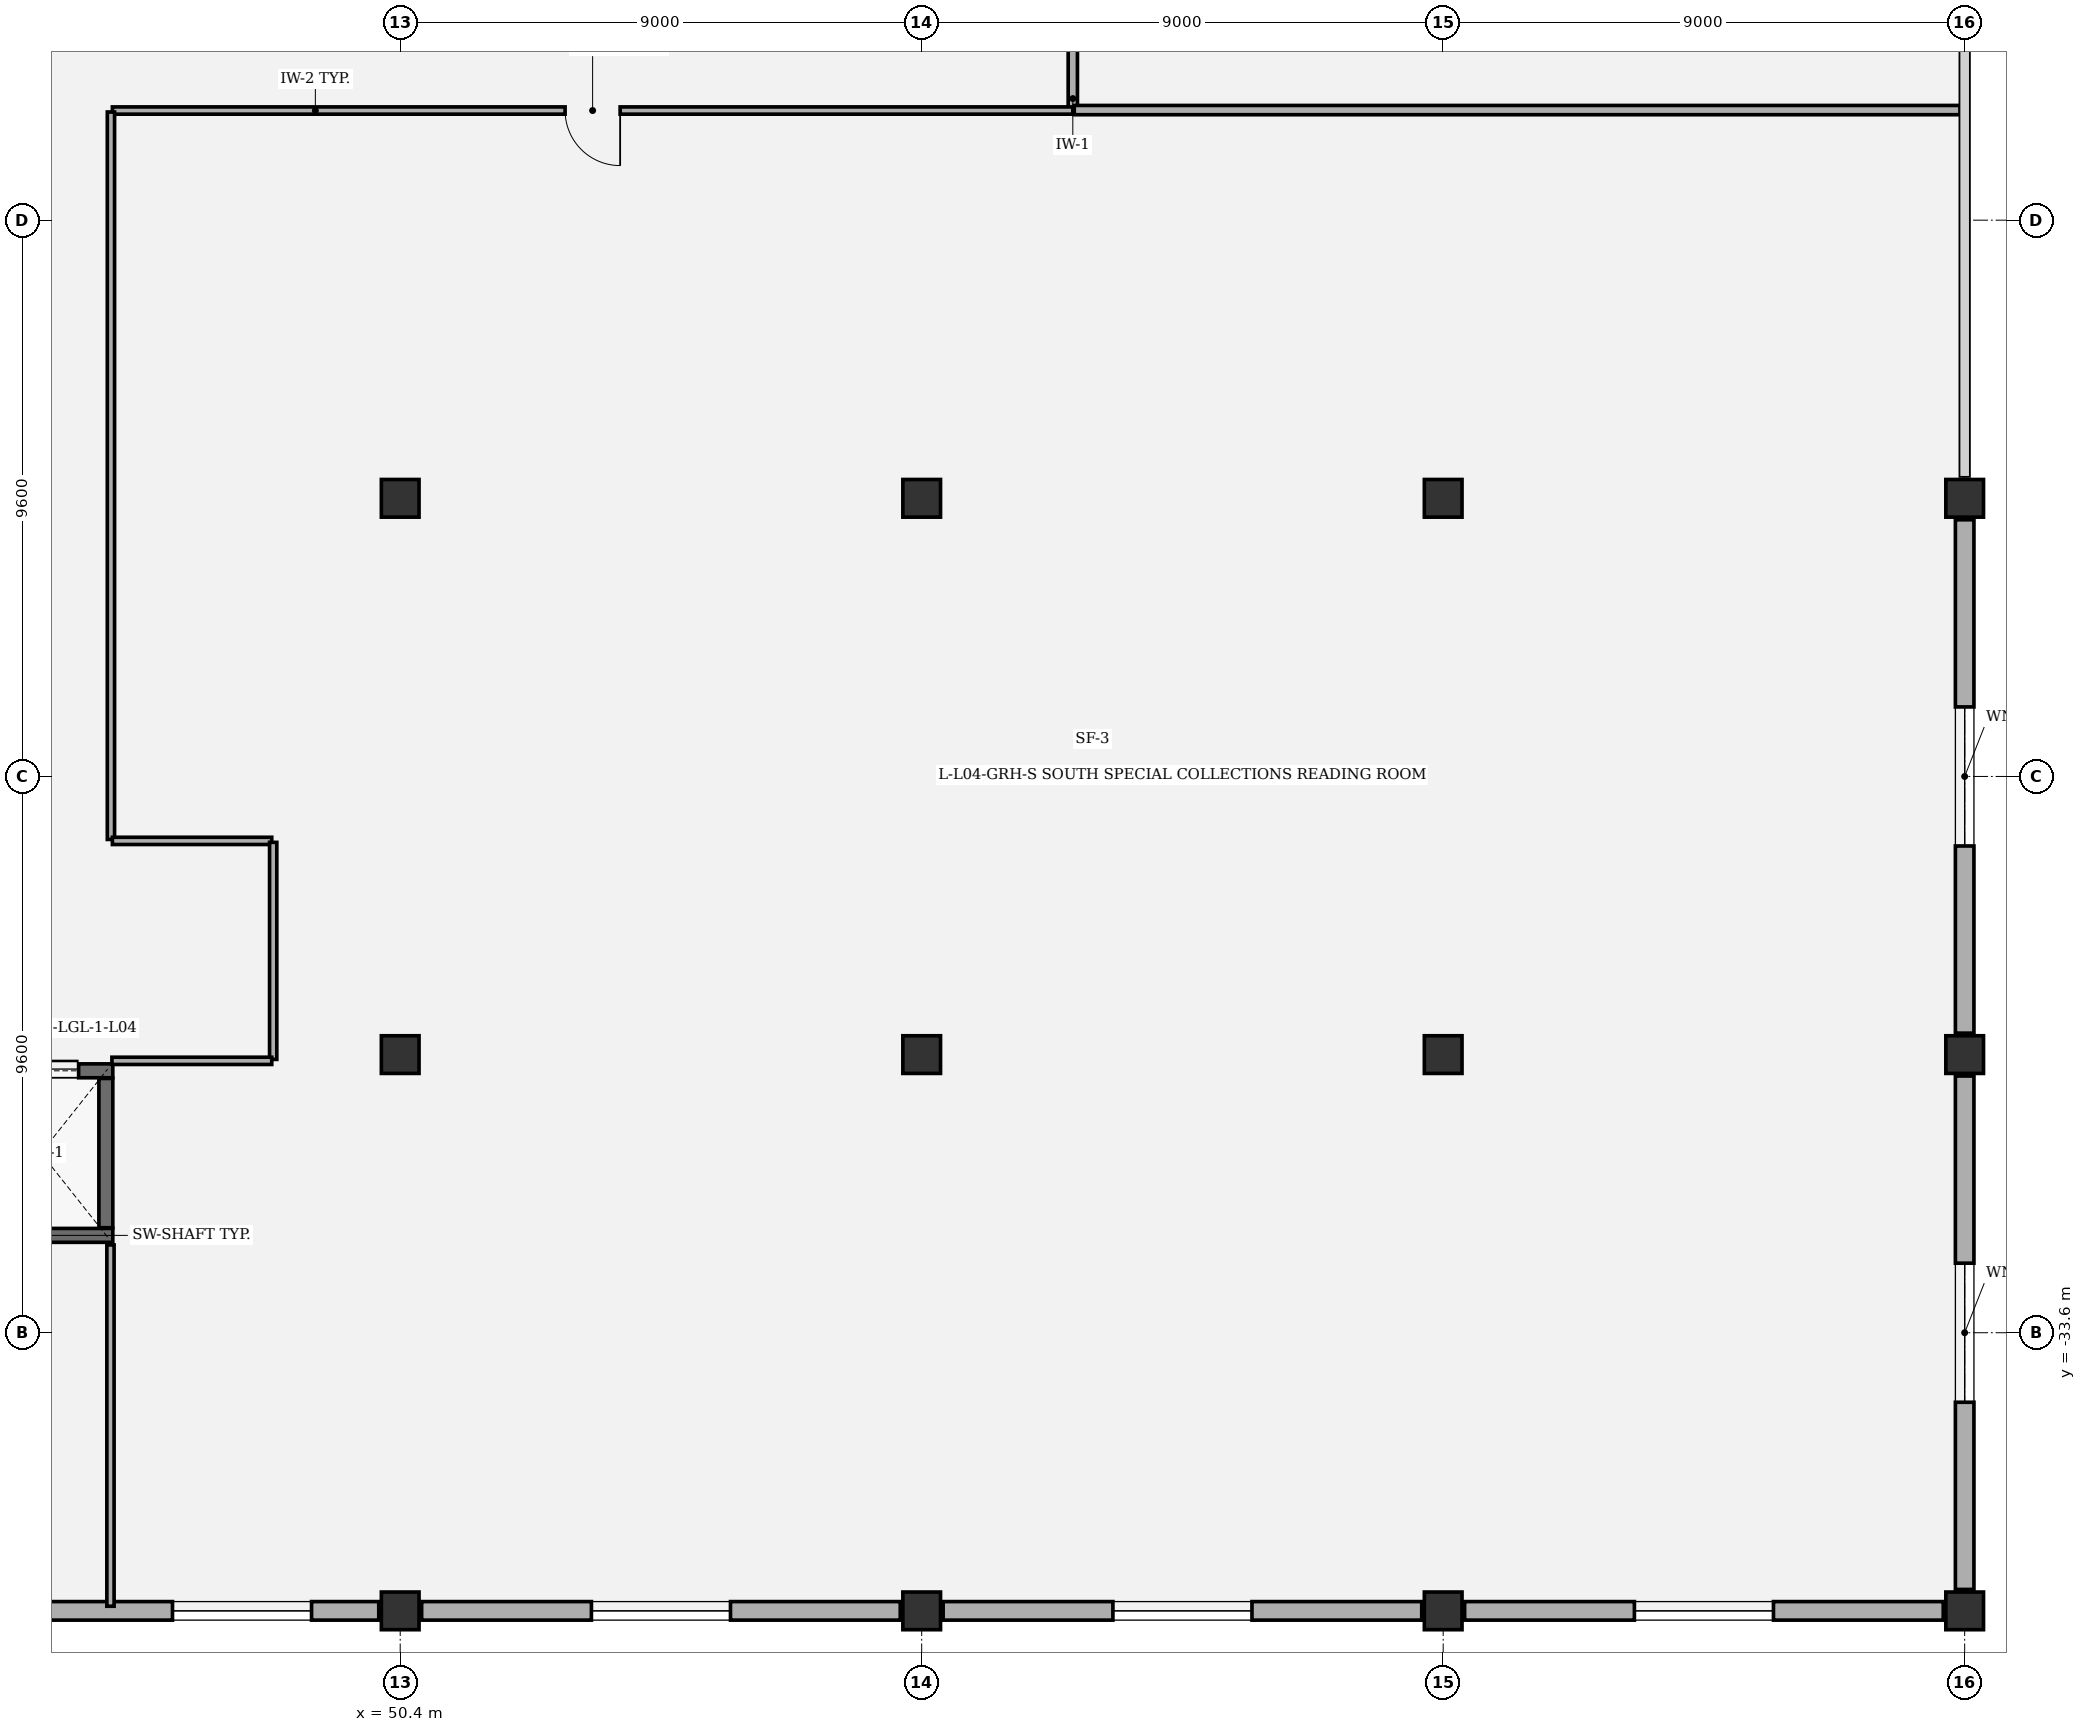
"""IFC4 building model, lengths in metres.
Left out: names, types, materials, properties, quantities, classifications, styles, units other than length and angle.
Written with IfcOpenShell. Run it as: python <this file> out.ifc"""

import sys

from ifc_helpers import new_model, si_unit, direction, frame, frame_2d, origin, origin_2d, place, context, subcontext, project, spatial, rectangle, extrude, element, fill, save


model = new_model("IFC4")
c1 = context("Model", 3, precision=1e-05, world=origin(), true_north=direction((0.0, 1.0)))
c2 = subcontext(c1, "Body", "Model", "MODEL_VIEW")
j1 = project(units=[si_unit("LENGTHUNIT", "METRE"), si_unit("PLANEANGLEUNIT", "RADIAN")], contexts=[c1])
p1 = place(None, origin())
s1 = spatial("IfcSite", under=j1, at=p1, CompositionType="ELEMENT")
p2 = place(p1, origin())
s2 = spatial("IfcBuilding", under=s1, at=p2, CompositionType="ELEMENT")
p3 = place(p2, frame((0.0, 0.0, 22.0)))
s3 = spatial("IfcBuildingStorey", under=s2, at=p3, CompositionType="ELEMENT", Elevation=22.0)
p4 = place(p3, frame((50.4, -38.4, 0.0), z_axis=(0.0, 0.0, 1.0), x_axis=(1.0, 0.0, 0.0)))
e1 = element("IfcColumn", 1, at=p4, inside=s3, PredefinedType="COLUMN", context=c2, shape_type="SweptSolid", body=[
    extrude(rectangle(XDim=0.65, YDim=0.65, at=origin_2d()), origin(), (0.0, 0.0, 1.0), 5.0),
])
p5 = place(p3, frame((50.4, -28.8, 0.0), z_axis=(0.0, 0.0, 1.0), x_axis=(1.0, 0.0, 0.0)))
e2 = element("IfcColumn", 2, at=p5, inside=s3, PredefinedType="COLUMN", context=c2, shape_type="SweptSolid", body=[
    extrude(rectangle(XDim=0.65, YDim=0.65, at=origin_2d()), origin(), (0.0, 0.0, 1.0), 7.094),
])
for number, where, z_axis, x_axis in (
    (3, (50.4, -19.2, 0.0), (0.0, 0.0, 1.0), (1.0, 0.0, 0.0)),
    (4, (59.4, -38.4, 0.0), (0.0, 0.0, 1.0), (1.0, 0.0, 0.0)),
):
    element("IfcColumn", number, at=place(p3, frame(where, z_axis=z_axis, x_axis=x_axis)), inside=s3, PredefinedType="COLUMN", context=c2, shape_type="SweptSolid", body=[
        extrude(rectangle(XDim=0.65, YDim=0.65, at=origin_2d()), origin(), (0.0, 0.0, 1.0), 5.0),
    ])
p6 = place(p3, frame((59.4, -28.8, 0.0), z_axis=(0.0, 0.0, 1.0), x_axis=(1.0, 0.0, 0.0)))
e5 = element("IfcColumn", 5, at=p6, inside=s3, PredefinedType="COLUMN", context=c2, shape_type="SweptSolid", body=[
    extrude(rectangle(XDim=0.65, YDim=0.65, at=origin_2d()), origin(), (0.0, 0.0, 1.0), 7.094),
])
for number, where, z_axis, x_axis in (
    (6, (59.4, -19.2, 0.0), (0.0, 0.0, 1.0), (1.0, 0.0, 0.0)),
    (7, (68.4, -38.4, 0.0), (0.0, 0.0, 1.0), (1.0, 0.0, 0.0)),
):
    element("IfcColumn", number, at=place(p3, frame(where, z_axis=z_axis, x_axis=x_axis)), inside=s3, PredefinedType="COLUMN", context=c2, shape_type="SweptSolid", body=[
        extrude(rectangle(XDim=0.65, YDim=0.65, at=origin_2d()), origin(), (0.0, 0.0, 1.0), 5.0),
    ])
p7 = place(p3, frame((68.4, -28.8, 0.0), z_axis=(0.0, 0.0, 1.0), x_axis=(1.0, 0.0, 0.0)))
e8 = element("IfcColumn", 8, at=p7, inside=s3, PredefinedType="COLUMN", context=c2, shape_type="SweptSolid", body=[
    extrude(rectangle(XDim=0.65, YDim=0.65, at=origin_2d()), origin(), (0.0, 0.0, 1.0), 7.094),
])
for number, where, z_axis, x_axis in (
    (9, (68.4, -19.2, 0.0), (0.0, 0.0, 1.0), (1.0, 0.0, 0.0)),
    (10, (77.4, -38.4, 0.0), (0.0, 0.0, 1.0), (1.0, 0.0, 0.0)),
):
    element("IfcColumn", number, at=place(p3, frame(where, z_axis=z_axis, x_axis=x_axis)), inside=s3, PredefinedType="COLUMN", context=c2, shape_type="SweptSolid", body=[
        extrude(rectangle(XDim=0.65, YDim=0.65, at=origin_2d()), origin(), (0.0, 0.0, 1.0), 5.0),
    ])
p8 = place(p3, frame((77.4, -28.8, 0.0), z_axis=(0.0, 0.0, 1.0), x_axis=(1.0, 0.0, 0.0)))
e11 = element("IfcColumn", 11, at=p8, inside=s3, PredefinedType="COLUMN", context=c2, shape_type="SweptSolid", body=[
    extrude(rectangle(XDim=0.65, YDim=0.65, at=origin_2d()), origin(), (0.0, 0.0, 1.0), 7.094),
])
p9 = place(p3, frame((77.4, -19.2, 0.0), z_axis=(0.0, 0.0, 1.0), x_axis=(1.0, 0.0, 0.0)))
e12 = element("IfcColumn", 12, at=p9, inside=s3, PredefinedType="COLUMN", context=c2, shape_type="SweptSolid", body=[
    extrude(rectangle(XDim=0.65, YDim=0.65, at=origin_2d()), origin(), (0.0, 0.0, 1.0), 5.0),
])
p10 = place(p3, frame((77.4, -29.17, 0.0), z_axis=(0.0, 0.0, 1.0), x_axis=(0.0, -1.0, 0.0)))
e13 = element("IfcWall", 13, at=p10, inside=s3, PredefinedType="SOLIDWALL", context=c2, shape_type="SweptSolid", body=[
    extrude(rectangle(XDim=8.86, YDim=0.32, at=frame_2d((4.43, 0.0))), origin(), (0.0, 0.0, 1.0), 4.7),
])
p11 = place(p10, frame((3.23, 0.0, 0.8)))
e14 = element("IfcOpeningElement", 14, at=p11, cuts=e13, PredefinedType="OPENING", context=c2, shape_type="SweptSolid", body=[
    extrude(rectangle(XDim=2.4, YDim=1.65, at=frame_2d((1.2, 0.825))), frame((0.0, 0.17, 0.0), z_axis=(0.0, -1.0, 0.0), x_axis=(1.0, 0.0, 0.0)), (0.0, 0.0, 1.0), 0.34),
])
p12 = place(p3, frame((77.4, -19.57, 0.0), z_axis=(0.0, 0.0, 1.0), x_axis=(0.0, -1.0, 0.0)))
e15 = element("IfcWall", 15, at=p12, inside=s3, PredefinedType="SOLIDWALL", context=c2, shape_type="SweptSolid", body=[
    extrude(rectangle(XDim=8.86, YDim=0.32, at=frame_2d((4.43, 0.0))), origin(), (0.0, 0.0, 1.0), 4.7),
])
p13 = place(p12, frame((3.23, 0.0, 0.8)))
e16 = element("IfcOpeningElement", 16, at=p13, cuts=e15, PredefinedType="OPENING", context=c2, shape_type="SweptSolid", body=[
    extrude(rectangle(XDim=2.4, YDim=1.65, at=frame_2d((1.2, 0.825))), frame((0.0, 0.17, 0.0), z_axis=(0.0, -1.0, 0.0), x_axis=(1.0, 0.0, 0.0)), (0.0, 0.0, 1.0), 0.34),
])
p14 = place(p3, frame((50.03, -38.4, 0.0), z_axis=(0.0, 0.0, 1.0), x_axis=(-1.0, 0.0, 0.0)))
e17 = element("IfcWall", 17, at=p14, inside=s3, PredefinedType="SOLIDWALL", context=c2, shape_type="SweptSolid", body=[
    extrude(rectangle(XDim=8.26, YDim=0.32, at=frame_2d((4.13, 0.0))), origin(), (0.0, 0.0, 1.0), 3.815),
])
p15 = place(p14, frame((1.16, 0.0, 0.8)))
e18 = element("IfcOpeningElement", 18, at=p15, cuts=e17, PredefinedType="OPENING", context=c2, shape_type="SweptSolid", body=[
    extrude(rectangle(XDim=2.4, YDim=1.65, at=frame_2d((1.2, 0.825))), frame((0.0, 0.17, 0.0), z_axis=(0.0, -1.0, 0.0), x_axis=(1.0, 0.0, 0.0)), (0.0, 0.0, 1.0), 0.34),
])
p16 = place(p3, frame((59.03, -38.4, 0.0), z_axis=(0.0, 0.0, 1.0), x_axis=(-1.0, 0.0, 0.0)))
e19 = element("IfcWall", 19, at=p16, inside=s3, PredefinedType="SOLIDWALL", context=c2, shape_type="SweptSolid", body=[
    extrude(rectangle(XDim=8.26, YDim=0.32, at=frame_2d((4.13, 0.0))), origin(), (0.0, 0.0, 1.0), 3.815),
])
p17 = place(p16, frame((2.93, 0.0, 0.8)))
e20 = element("IfcOpeningElement", 20, at=p17, cuts=e19, PredefinedType="OPENING", context=c2, shape_type="SweptSolid", body=[
    extrude(rectangle(XDim=2.4, YDim=1.65, at=frame_2d((1.2, 0.825))), frame((0.0, 0.17, 0.0), z_axis=(0.0, -1.0, 0.0), x_axis=(1.0, 0.0, 0.0)), (0.0, 0.0, 1.0), 0.34),
])
p18 = place(p3, frame((68.03, -38.4, 0.0), z_axis=(0.0, 0.0, 1.0), x_axis=(-1.0, 0.0, 0.0)))
e21 = element("IfcWall", 21, at=p18, inside=s3, PredefinedType="SOLIDWALL", context=c2, shape_type="SweptSolid", body=[
    extrude(rectangle(XDim=8.26, YDim=0.32, at=frame_2d((4.13, 0.0))), origin(), (0.0, 0.0, 1.0), 3.815),
])
p19 = place(p18, frame((2.93, 0.0, 0.8)))
e22 = element("IfcOpeningElement", 22, at=p19, cuts=e21, PredefinedType="OPENING", context=c2, shape_type="SweptSolid", body=[
    extrude(rectangle(XDim=2.4, YDim=1.65, at=frame_2d((1.2, 0.825))), frame((0.0, 0.17, 0.0), z_axis=(0.0, -1.0, 0.0), x_axis=(1.0, 0.0, 0.0)), (0.0, 0.0, 1.0), 0.34),
])
p20 = place(p3, frame((77.03, -38.4, 0.0), z_axis=(0.0, 0.0, 1.0), x_axis=(-1.0, 0.0, 0.0)))
e23 = element("IfcWall", 23, at=p20, inside=s3, PredefinedType="SOLIDWALL", context=c2, shape_type="SweptSolid", body=[
    extrude(rectangle(XDim=8.26, YDim=0.32, at=frame_2d((4.13, 0.0))), origin(), (0.0, 0.0, 1.0), 3.815),
])
p21 = place(p20, frame((2.93, 0.0, 0.8)))
e24 = element("IfcOpeningElement", 24, at=p21, cuts=e23, PredefinedType="OPENING", context=c2, shape_type="SweptSolid", body=[
    extrude(rectangle(XDim=2.4, YDim=1.65, at=frame_2d((1.2, 0.825))), frame((0.0, 0.17, 0.0), z_axis=(0.0, -1.0, 0.0), x_axis=(1.0, 0.0, 0.0)), (0.0, 0.0, 1.0), 0.34),
])
p22 = place(p3, frame((45.44, -31.92, 0.0), z_axis=(0.0, 0.0, 1.0), x_axis=(-1.0, 0.0, 0.0)))
e25 = element("IfcWall", 25, at=p22, inside=s3, PredefinedType="SHEAR", context=c2, shape_type="SweptSolid", body=[
    extrude(rectangle(XDim=2.48, YDim=0.24, at=frame_2d((1.24, 0.0))), origin(), (0.0, 0.0, 1.0), 4.75),
])
p23 = place(p3, frame((42.96, -29.08, 0.0), z_axis=(0.0, 0.0, 1.0), x_axis=(1.0, 0.0, 0.0)))
e26 = element("IfcWall", 26, at=p23, inside=s3, PredefinedType="SHEAR", context=c2, shape_type="SweptSolid", body=[
    extrude(rectangle(XDim=2.48, YDim=0.24, at=frame_2d((1.24, 0.0))), origin(), (0.0, 0.0, 1.0), 4.75),
])
p24 = place(p23, frame((0.59, 0.0, 0.0)))
e27 = element("IfcOpeningElement", 27, at=p24, cuts=e26, PredefinedType="OPENING", context=c2, shape_type="SweptSolid", body=[
    extrude(rectangle(XDim=1.3, YDim=2.3, at=frame_2d((0.65, 1.15))), frame((0.0, 0.13, 0.0), z_axis=(0.0, -1.0, 0.0), x_axis=(1.0, 0.0, 0.0)), (0.0, 0.0, 1.0), 0.26),
])
p25 = place(p3, frame((45.32, -29.212, 0.0), z_axis=(0.0, 0.0, 1.0), x_axis=(0.0, -1.0, 0.0)))
e28 = element("IfcWall", 28, at=p25, inside=s3, PredefinedType="SHEAR", context=c2, shape_type="SweptSolid", body=[
    extrude(rectangle(XDim=2.576, YDim=0.24, at=frame_2d((1.288, 0.0))), origin(), (0.0, 0.0, 1.0), 4.75),
])
p26 = place(p3, frame((62.008, -9.217, 0.0), z_axis=(0.0, 0.0, 1.0), x_axis=(0.0, -1.0, 0.0)))
e29 = element("IfcWall", 29, at=p26, inside=s3, PredefinedType="PARTITIONING", context=c2, shape_type="SweptSolid", body=[
    extrude(rectangle(XDim=3.258, YDim=0.16, at=frame_2d((1.629, 0.0))), origin(), (0.0, 0.0, 1.0), 4.7),
])
p27 = place(p26, frame((1.154, 0.0, 0.0)))
e30 = element("IfcOpeningElement", 30, at=p27, cuts=e29, PredefinedType="OPENING", context=c2, shape_type="SweptSolid", body=[
    extrude(rectangle(XDim=0.95, YDim=2.15, at=frame_2d((0.475, 1.075))), frame((0.0, 0.09, 0.0), z_axis=(0.0, -1.0, 0.0), x_axis=(1.0, 0.0, 0.0)), (0.0, 0.0, 1.0), 0.18),
])
p28 = place(p3, frame((62.033, -12.5, 0.0), z_axis=(0.0, 0.0, 1.0), x_axis=(1.0, 0.0, 0.0)))
e31 = element("IfcWall", 31, at=p28, inside=s3, PredefinedType="PARTITIONING", context=c2, shape_type="SweptSolid", body=[
    extrude(rectangle(XDim=15.287, YDim=0.16, at=frame_2d((7.644, 0.0))), origin(), (0.0, 0.0, 1.0), 4.7),
])
p29 = place(p3, frame((62.008, -12.508, 0.0), z_axis=(0.0, 0.0, 1.0), x_axis=(-1.0, 0.0, 0.0)))
e32 = element("IfcWall", 32, at=p29, inside=s3, PredefinedType="PARTITIONING", context=c2, shape_type="SweptSolid", body=[
    extrude(rectangle(XDim=16.575, YDim=0.125, at=frame_2d((8.288, 0.0))), origin(), (0.0, 0.0, 1.0), 4.7),
])
p30 = place(p29, frame((7.812, 0.0, 0.0)))
e33 = element("IfcOpeningElement", 33, at=p30, cuts=e32, PredefinedType="OPENING", context=c2, shape_type="SweptSolid", body=[
    extrude(rectangle(XDim=0.95, YDim=2.15, at=frame_2d((0.475, 1.075))), frame((0.0, 0.073, 0.0), z_axis=(0.0, -1.0, 0.0), x_axis=(1.0, 0.0, 0.0)), (0.0, 0.0, 1.0), 0.145),
])
p31 = place(p3, frame((45.408, -12.533, 0.0), z_axis=(0.0, 0.0, 1.0), x_axis=(0.0, -1.0, 0.0)))
e34 = element("IfcWall", 34, at=p31, inside=s3, PredefinedType="PARTITIONING", context=c2, shape_type="SweptSolid", body=[
    extrude(rectangle(XDim=12.554, YDim=0.125, at=frame_2d((6.277, 0.0))), origin(), (0.0, 0.0, 1.0), 4.7),
])
p32 = place(p3, frame((48.183, -25.112, 0.0), z_axis=(0.0, 0.0, 1.0), x_axis=(-1.0, 0.0, 0.0)))
e35 = element("IfcWall", 35, at=p32, inside=s3, PredefinedType="PARTITIONING", context=c2, shape_type="SweptSolid", body=[
    extrude(rectangle(XDim=2.75, YDim=0.125, at=frame_2d((1.375, 0.0))), origin(), (0.0, 0.0, 1.0), 4.7),
])
p33 = place(p3, frame((48.208, -25.137, 0.0), z_axis=(0.0, 0.0, 1.0), x_axis=(0.0, -1.0, 0.0)))
e36 = element("IfcWall", 36, at=p33, inside=s3, PredefinedType="PARTITIONING", context=c2, shape_type="SweptSolid", body=[
    extrude(rectangle(XDim=3.746, YDim=0.125, at=frame_2d((1.873, 0.0))), origin(), (0.0, 0.0, 1.0), 4.7),
])
p34 = place(p3, frame((45.425, -28.908, 0.0), z_axis=(0.0, 0.0, 1.0), x_axis=(1.0, 0.0, 0.0)))
e37 = element("IfcWall", 37, at=p34, inside=s3, PredefinedType="PARTITIONING", context=c2, shape_type="SweptSolid", body=[
    extrude(rectangle(XDim=2.758, YDim=0.125, at=frame_2d((1.379, 0.0))), origin(), (0.0, 0.0, 1.0), 4.513),
])
p35 = place(p3, frame((45.4, -32.085, 0.0), z_axis=(0.0, 0.0, 1.0), x_axis=(0.0, -1.0, 0.0)))
e38 = element("IfcWall", 38, at=p35, inside=s3, PredefinedType="PARTITIONING", context=c2, shape_type="SweptSolid", body=[
    extrude(rectangle(XDim=6.235, YDim=0.125, at=frame_2d((3.118, 0.0))), origin(), (0.0, 0.0, 1.0), 4.7),
])
p36 = place(p11, origin())
e39 = element("IfcWindow", 39, at=p36, inside=s3, PartitioningType="SINGLE_PANEL", PredefinedType="WINDOW", context=c2, shape_type="SweptSolid", body=[
    extrude(rectangle(XDim=2.4, YDim=1.65, at=frame_2d((1.2, 0.825))), frame((0.0, 0.03, 0.0), z_axis=(0.0, -1.0, 0.0), x_axis=(1.0, 0.0, 0.0)), (0.0, 0.0, 1.0), 0.06),
])
fill(e14, e39)
p37 = place(p13, origin())
e40 = element("IfcWindow", 40, at=p37, inside=s3, PartitioningType="SINGLE_PANEL", PredefinedType="WINDOW", context=c2, shape_type="SweptSolid", body=[
    extrude(rectangle(XDim=2.4, YDim=1.65, at=frame_2d((1.2, 0.825))), frame((0.0, 0.03, 0.0), z_axis=(0.0, -1.0, 0.0), x_axis=(1.0, 0.0, 0.0)), (0.0, 0.0, 1.0), 0.06),
])
fill(e16, e40)
p38 = place(p15, origin())
e41 = element("IfcWindow", 41, at=p38, inside=s3, PartitioningType="SINGLE_PANEL", PredefinedType="WINDOW", context=c2, shape_type="SweptSolid", body=[
    extrude(rectangle(XDim=2.4, YDim=1.65, at=frame_2d((1.2, 0.825))), frame((0.0, 0.03, 0.0), z_axis=(0.0, -1.0, 0.0), x_axis=(1.0, 0.0, 0.0)), (0.0, 0.0, 1.0), 0.06),
])
fill(e18, e41)
p39 = place(p17, origin())
e42 = element("IfcWindow", 42, at=p39, inside=s3, PartitioningType="SINGLE_PANEL", PredefinedType="WINDOW", context=c2, shape_type="SweptSolid", body=[
    extrude(rectangle(XDim=2.4, YDim=1.65, at=frame_2d((1.2, 0.825))), frame((0.0, 0.03, 0.0), z_axis=(0.0, -1.0, 0.0), x_axis=(1.0, 0.0, 0.0)), (0.0, 0.0, 1.0), 0.06),
])
fill(e20, e42)
p40 = place(p19, origin())
e43 = element("IfcWindow", 43, at=p40, inside=s3, PartitioningType="SINGLE_PANEL", PredefinedType="WINDOW", context=c2, shape_type="SweptSolid", body=[
    extrude(rectangle(XDim=2.4, YDim=1.65, at=frame_2d((1.2, 0.825))), frame((0.0, 0.03, 0.0), z_axis=(0.0, -1.0, 0.0), x_axis=(1.0, 0.0, 0.0)), (0.0, 0.0, 1.0), 0.06),
])
fill(e22, e43)
p41 = place(p21, origin())
e44 = element("IfcWindow", 44, at=p41, inside=s3, PartitioningType="SINGLE_PANEL", PredefinedType="WINDOW", context=c2, shape_type="SweptSolid", body=[
    extrude(rectangle(XDim=2.4, YDim=1.65, at=frame_2d((1.2, 0.825))), frame((0.0, 0.03, 0.0), z_axis=(0.0, -1.0, 0.0), x_axis=(1.0, 0.0, 0.0)), (0.0, 0.0, 1.0), 0.06),
])
fill(e24, e44)
p42 = place(p24, origin())
e45 = element("IfcDoor", 45, at=p42, inside=s3, OperationType="DOUBLE_DOOR_SLIDING", PredefinedType="DOOR", context=c2, shape_type="SweptSolid", body=[
    extrude(rectangle(XDim=1.3, YDim=2.3, at=frame_2d((0.65, 1.15))), frame((0.0, 0.025, 0.0), z_axis=(0.0, -1.0, 0.0), x_axis=(1.0, 0.0, 0.0)), (0.0, 0.0, 1.0), 0.05),
])
fill(e27, e45)
p43 = place(p30, origin())
e46 = element("IfcDoor", 46, at=p43, inside=s3, OperationType="SINGLE_SWING_LEFT", PredefinedType="DOOR", context=c2, shape_type="SweptSolid", body=[
    extrude(rectangle(XDim=0.95, YDim=2.15, at=frame_2d((0.475, 1.075))), frame((0.0, 0.025, 0.0), z_axis=(0.0, -1.0, 0.0), x_axis=(1.0, 0.0, 0.0)), (0.0, 0.0, 1.0), 0.05),
])
fill(e33, e46)
save(model, sys.argv[1])
